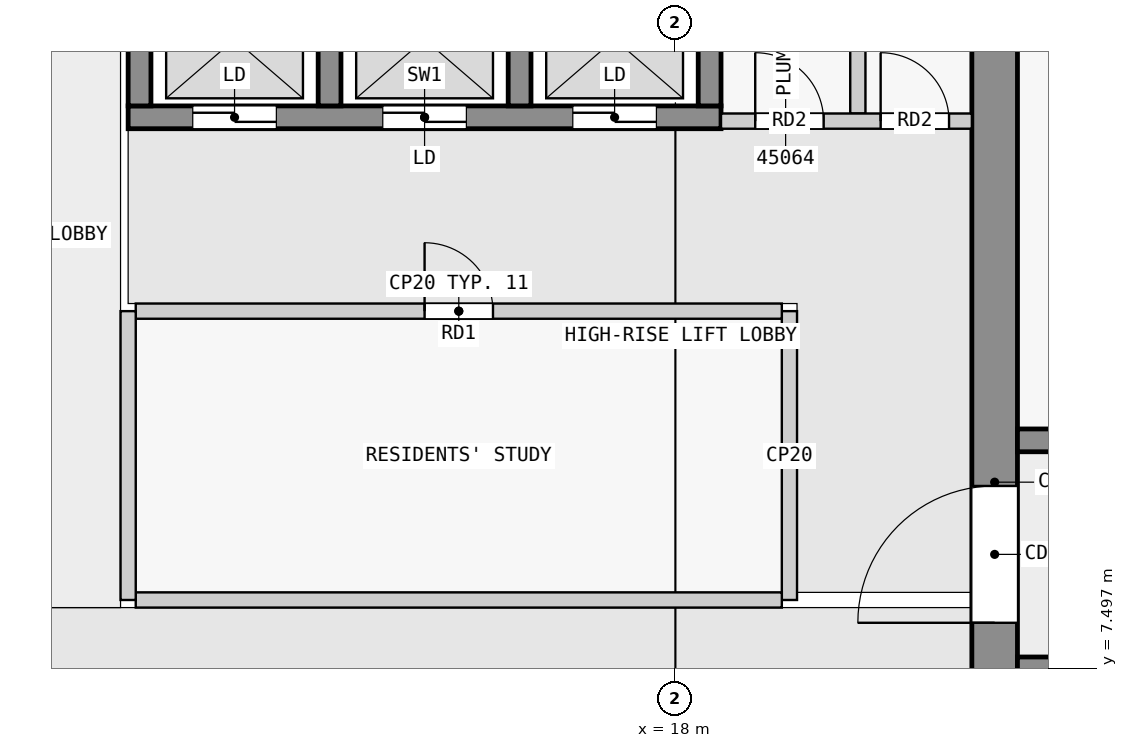
"""IFC4 building model, lengths in metres.
Left out: names, types, materials, properties, quantities, classifications, styles, units other than length and angle.
Written with IfcOpenShell. Run it as: python <this file> out.ifc"""

import sys

from ifc_helpers import new_model, si_unit, direction, frame, frame_2d, origin, place, context, subcontext, project, spatial, rectangle, extrude, element, fill, save


model = new_model("IFC4")
c1 = context("Model", 3, precision=1e-05, world=origin(), true_north=direction((0.0, 1.0)))
c2 = subcontext(c1, "Body", "Model", "MODEL_VIEW")
j1 = project(units=[si_unit("LENGTHUNIT", "METRE"), si_unit("PLANEANGLEUNIT", "RADIAN")], contexts=[c1])
p1 = place(None, origin())
s1 = spatial("IfcSite", under=j1, at=p1, CompositionType="ELEMENT")
p2 = place(p1, origin())
s2 = spatial("IfcBuilding", under=s1, at=p2, CompositionType="ELEMENT")
p3 = place(p2, frame((0.0, 0.0, 174.4)))
s3 = spatial("IfcBuildingStorey", under=s2, at=p3, CompositionType="ELEMENT", Elevation=174.4)
p4 = place(p3, frame((22.2, 2.5, 0.0), z_axis=(0.0, 0.0, 1.0), x_axis=(0.0, 1.0, 0.0)))
e1 = element("IfcWall", 1, at=p4, inside=s3, PredefinedType="SHEAR", context=c2, shape_type="SweptSolid", body=[
    extrude(rectangle(XDim=14.9, YDim=0.6, at=frame_2d((7.45, 0.0))), origin(), (0.0, 0.0, 1.0), 3.25),
])
p5 = place(p4, frame((5.6, 0.0, 0.0)))
e2 = element("IfcOpeningElement", 2, at=p5, cuts=e1, PredefinedType="OPENING", context=c2, shape_type="SweptSolid", body=[
    extrude(rectangle(XDim=1.8, YDim=2.1, at=frame_2d((0.9, 1.05))), frame((0.0, 0.31, 0.0), z_axis=(0.0, -1.0, 0.0), x_axis=(1.0, 0.0, 0.0)), (0.0, 0.0, 1.0), 0.62),
])
p6 = place(p3, frame((10.8, 14.75, 0.0), z_axis=(0.0, 0.0, 1.0), x_axis=(1.0, 0.0, 0.0)))
e3 = element("IfcWall", 3, at=p6, inside=s3, PredefinedType="SHEAR", context=c2, shape_type="SweptSolid", body=[
    extrude(rectangle(XDim=7.8, YDim=0.3, at=frame_2d((3.9, 0.0))), origin(), (0.0, 0.0, 1.0), 3.25),
])
p7 = place(p6, frame((0.85, 0.0, 0.0)))
e4 = element("IfcOpeningElement", 4, at=p7, cuts=e3, PredefinedType="OPENING", context=c2, shape_type="SweptSolid", body=[
    extrude(rectangle(XDim=1.1, YDim=2.1, at=frame_2d((0.55, 1.05))), frame((0.0, 0.16, 0.0), z_axis=(0.0, -1.0, 0.0), x_axis=(1.0, 0.0, 0.0)), (0.0, 0.0, 1.0), 0.32),
])
p8 = place(p6, frame((3.35, 0.0, 0.0)))
e5 = element("IfcOpeningElement", 5, at=p8, cuts=e3, PredefinedType="OPENING", context=c2, shape_type="SweptSolid", body=[
    extrude(rectangle(XDim=1.1, YDim=2.1, at=frame_2d((0.55, 1.05))), frame((0.0, 0.16, 0.0), z_axis=(0.0, -1.0, 0.0), x_axis=(1.0, 0.0, 0.0)), (0.0, 0.0, 1.0), 0.32),
])
p9 = place(p6, frame((5.85, 0.0, 0.0)))
e6 = element("IfcOpeningElement", 6, at=p9, cuts=e3, PredefinedType="OPENING", context=c2, shape_type="SweptSolid", body=[
    extrude(rectangle(XDim=1.1, YDim=2.1, at=frame_2d((0.55, 1.05))), frame((0.0, 0.16, 0.0), z_axis=(0.0, -1.0, 0.0), x_axis=(1.0, 0.0, 0.0)), (0.0, 0.0, 1.0), 0.32),
])
for number, where, z_axis, x_axis in (
    (7, (10.95, 14.9, 0.0), (0.0, 0.0, 1.0), (0.0, 1.0, 0.0)),
    (8, (13.45, 14.9, 0.0), (0.0, 0.0, 1.0), (0.0, 1.0, 0.0)),
    (9, (15.95, 14.9, 0.0), (0.0, 0.0, 1.0), (0.0, 1.0, 0.0)),
    (10, (18.45, 14.9, 0.0), (0.0, 0.0, 1.0), (0.0, 1.0, 0.0)),
):
    element("IfcWall", number, at=place(p3, frame(where, z_axis=z_axis, x_axis=x_axis)), inside=s3, PredefinedType="SHEAR", context=c2, shape_type="SweptSolid", body=[
        extrude(rectangle(XDim=2.0, YDim=0.3, at=frame_2d((1.0, 0.0))), origin(), (0.0, 0.0, 1.0), 3.25),
    ])
p10 = place(p3, frame((22.5, 7.5, 0.0), z_axis=(0.0, 0.0, 1.0), x_axis=(1.0, 0.0, 0.0)))
e11 = element("IfcWall", 11, at=p10, inside=s3, PredefinedType="SHEAR", context=c2, shape_type="SweptSolid", body=[
    extrude(rectangle(XDim=22.5, YDim=0.3, at=frame_2d((11.25, 0.0))), origin(), (0.0, 0.0, 1.0), 3.25),
])
p11 = place(p10, frame((4.05, 0.0, 0.0)))
e12 = element("IfcOpeningElement", 12, at=p11, cuts=e11, PredefinedType="OPENING", context=c2, shape_type="SweptSolid", body=[
    extrude(rectangle(XDim=1.0, YDim=2.1, at=frame_2d((0.5, 1.05))), frame((0.0, 0.16, 0.0), z_axis=(0.0, -1.0, 0.0), x_axis=(1.0, 0.0, 0.0)), (0.0, 0.0, 1.0), 0.32),
])
p12 = place(p10, frame((10.75, 0.0, 0.0)))
e13 = element("IfcOpeningElement", 13, at=p12, cuts=e11, PredefinedType="OPENING", context=c2, shape_type="SweptSolid", body=[
    extrude(rectangle(XDim=1.0, YDim=2.1, at=frame_2d((0.5, 1.05))), frame((0.0, 0.16, 0.0), z_axis=(0.0, -1.0, 0.0), x_axis=(1.0, 0.0, 0.0)), (0.0, 0.0, 1.0), 0.32),
])
p13 = place(p10, frame((15.35, 0.0, 0.0)))
e14 = element("IfcOpeningElement", 14, at=p13, cuts=e11, PredefinedType="OPENING", context=c2, shape_type="SweptSolid", body=[
    extrude(rectangle(XDim=0.9, YDim=2.1, at=frame_2d((0.45, 1.05))), frame((0.0, 0.16, 0.0), z_axis=(0.0, -1.0, 0.0), x_axis=(1.0, 0.0, 0.0)), (0.0, 0.0, 1.0), 0.32),
])
p14 = place(p10, frame((18.75, 0.0, 0.0)))
e15 = element("IfcOpeningElement", 15, at=p14, cuts=e11, PredefinedType="OPENING", context=c2, shape_type="SweptSolid", body=[
    extrude(rectangle(XDim=0.9, YDim=2.1, at=frame_2d((0.45, 1.05))), frame((0.0, 0.16, 0.0), z_axis=(0.0, -1.0, 0.0), x_axis=(1.0, 0.0, 0.0)), (0.0, 0.0, 1.0), 0.32),
])
p15 = place(p10, frame((20.95, 0.0, 0.0)))
e16 = element("IfcOpeningElement", 16, at=p15, cuts=e11, PredefinedType="OPENING", context=c2, shape_type="SweptSolid", body=[
    extrude(rectangle(XDim=1.0, YDim=2.1, at=frame_2d((0.5, 1.05))), frame((0.0, 0.16, 0.0), z_axis=(0.0, -1.0, 0.0), x_axis=(1.0, 0.0, 0.0)), (0.0, 0.0, 1.0), 0.32),
])
p16 = place(p3, frame((22.5, 10.5, 0.0), z_axis=(0.0, 0.0, 1.0), x_axis=(1.0, 0.0, 0.0)))
e17 = element("IfcWall", 17, at=p16, inside=s3, PredefinedType="SHEAR", context=c2, shape_type="SweptSolid", body=[
    extrude(rectangle(XDim=22.5, YDim=0.3, at=frame_2d((11.25, 0.0))), origin(), (0.0, 0.0, 1.0), 3.25),
])
p17 = place(p16, frame((1.85, 0.0, 0.0)))
e18 = element("IfcOpeningElement", 18, at=p17, cuts=e17, PredefinedType="OPENING", context=c2, shape_type="SweptSolid", body=[
    extrude(rectangle(XDim=0.9, YDim=2.1, at=frame_2d((0.45, 1.05))), frame((0.0, 0.16, 0.0), z_axis=(0.0, -1.0, 0.0), x_axis=(1.0, 0.0, 0.0)), (0.0, 0.0, 1.0), 0.32),
])
p18 = place(p16, frame((6.25, 0.0, 0.0)))
e19 = element("IfcOpeningElement", 19, at=p18, cuts=e17, PredefinedType="OPENING", context=c2, shape_type="SweptSolid", body=[
    extrude(rectangle(XDim=1.0, YDim=2.1, at=frame_2d((0.5, 1.05))), frame((0.0, 0.16, 0.0), z_axis=(0.0, -1.0, 0.0), x_axis=(1.0, 0.0, 0.0)), (0.0, 0.0, 1.0), 0.32),
])
p19 = place(p16, frame((10.35, 0.0, 0.0)))
e20 = element("IfcOpeningElement", 20, at=p19, cuts=e17, PredefinedType="OPENING", context=c2, shape_type="SweptSolid", body=[
    extrude(rectangle(XDim=1.8, YDim=2.1, at=frame_2d((0.9, 1.05))), frame((0.0, 0.16, 0.0), z_axis=(0.0, -1.0, 0.0), x_axis=(1.0, 0.0, 0.0)), (0.0, 0.0, 1.0), 0.32),
])
p20 = place(p16, frame((16.85, 0.0, 0.0)))
e21 = element("IfcOpeningElement", 21, at=p20, cuts=e17, PredefinedType="OPENING", context=c2, shape_type="SweptSolid", body=[
    extrude(rectangle(XDim=1.0, YDim=2.1, at=frame_2d((0.5, 1.05))), frame((0.0, 0.16, 0.0), z_axis=(0.0, -1.0, 0.0), x_axis=(1.0, 0.0, 0.0)), (0.0, 0.0, 1.0), 0.32),
])
p21 = place(p3, frame((10.8, 8.4, 0.0), z_axis=(0.0, 0.0, 1.0), x_axis=(0.0, 1.0, 0.0)))
e22 = element("IfcWall", 22, at=p21, inside=s3, PredefinedType="PARTITIONING", context=c2, shape_type="SweptSolid", body=[
    extrude(rectangle(XDim=3.8, YDim=0.2, at=frame_2d((1.9, 0.0))), origin(), (0.0, 0.0, 1.0), 3.25),
])
p22 = place(p3, frame((10.9, 8.4, 0.0), z_axis=(0.0, 0.0, 1.0), x_axis=(1.0, 0.0, 0.0)))
e23 = element("IfcWall", 23, at=p22, inside=s3, PredefinedType="PARTITIONING", context=c2, shape_type="SweptSolid", body=[
    extrude(rectangle(XDim=8.5, YDim=0.2, at=frame_2d((4.25, 0.0))), origin(), (0.0, 0.0, 1.0), 3.25),
])
p23 = place(p3, frame((19.5, 8.4, 0.0), z_axis=(0.0, 0.0, 1.0), x_axis=(0.0, 1.0, 0.0)))
e24 = element("IfcWall", 24, at=p23, inside=s3, PredefinedType="PARTITIONING", context=c2, shape_type="SweptSolid", body=[
    extrude(rectangle(XDim=3.8, YDim=0.2, at=frame_2d((1.9, 0.0))), origin(), (0.0, 0.0, 1.0), 3.25),
])
p24 = place(p3, frame((10.9, 12.2, 0.0), z_axis=(0.0, 0.0, 1.0), x_axis=(1.0, 0.0, 0.0)))
e25 = element("IfcWall", 25, at=p24, inside=s3, PredefinedType="PARTITIONING", context=c2, shape_type="SweptSolid", body=[
    extrude(rectangle(XDim=8.5, YDim=0.2, at=frame_2d((4.25, 0.0))), origin(), (0.0, 0.0, 1.0), 3.25),
])
p25 = place(p24, frame((3.8, 0.0, 0.0)))
e26 = element("IfcOpeningElement", 26, at=p25, cuts=e25, PredefinedType="OPENING", context=c2, shape_type="SweptSolid", body=[
    extrude(rectangle(XDim=0.9, YDim=2.1, at=frame_2d((0.45, 1.05))), frame((0.0, 0.11, 0.0), z_axis=(0.0, -1.0, 0.0), x_axis=(1.0, 0.0, 0.0)), (0.0, 0.0, 1.0), 0.22),
])
p26 = place(p3, frame((18.6, 14.7, 0.0), z_axis=(0.0, 0.0, 1.0), x_axis=(1.0, 0.0, 0.0)))
e27 = element("IfcWall", 27, at=p26, inside=s3, PredefinedType="PARTITIONING", context=c2, shape_type="SweptSolid", body=[
    extrude(rectangle(XDim=3.3, YDim=0.2, at=frame_2d((1.65, 0.0))), origin(), (0.0, 0.0, 1.0), 3.25),
])
p27 = place(p26, frame((0.45, 0.0, 0.0)))
e28 = element("IfcOpeningElement", 28, at=p27, cuts=e27, PredefinedType="OPENING", context=c2, shape_type="SweptSolid", body=[
    extrude(rectangle(XDim=0.9, YDim=2.1, at=frame_2d((0.45, 1.05))), frame((0.0, 0.11, 0.0), z_axis=(0.0, -1.0, 0.0), x_axis=(1.0, 0.0, 0.0)), (0.0, 0.0, 1.0), 0.22),
])
p28 = place(p26, frame((2.1, 0.0, 0.0)))
e29 = element("IfcOpeningElement", 29, at=p28, cuts=e27, PredefinedType="OPENING", context=c2, shape_type="SweptSolid", body=[
    extrude(rectangle(XDim=0.9, YDim=2.1, at=frame_2d((0.45, 1.05))), frame((0.0, 0.11, 0.0), z_axis=(0.0, -1.0, 0.0), x_axis=(1.0, 0.0, 0.0)), (0.0, 0.0, 1.0), 0.22),
])
p29 = place(p3, frame((20.4, 14.8, 0.0), z_axis=(0.0, 0.0, 1.0), x_axis=(0.0, 1.0, 0.0)))
e30 = element("IfcWall", 30, at=p29, inside=s3, PredefinedType="PARTITIONING", context=c2, shape_type="SweptSolid", body=[
    extrude(rectangle(XDim=2.6, YDim=0.2, at=frame_2d((1.3, 0.0))), origin(), (0.0, 0.0, 1.0), 3.25),
])
p30 = place(p25, origin())
e31 = element("IfcDoor", 31, at=p30, inside=s3, OperationType="SINGLE_SWING_LEFT", PredefinedType="DOOR", context=c2, shape_type="SweptSolid", body=[
    extrude(rectangle(XDim=0.9, YDim=2.1, at=frame_2d((0.45, 1.05))), frame((0.0, 0.025, 0.0), z_axis=(0.0, -1.0, 0.0), x_axis=(1.0, 0.0, 0.0)), (0.0, 0.0, 1.0), 0.05),
])
fill(e26, e31)
p31 = place(p7, origin())
e32 = element("IfcDoor", 32, at=p31, inside=s3, OperationType="DOUBLE_DOOR_SLIDING", PredefinedType="DOOR", context=c2, shape_type="SweptSolid", body=[
    extrude(rectangle(XDim=1.1, YDim=2.1, at=frame_2d((0.55, 1.05))), frame((0.0, 0.025, 0.0), z_axis=(0.0, -1.0, 0.0), x_axis=(1.0, 0.0, 0.0)), (0.0, 0.0, 1.0), 0.05),
])
fill(e4, e32)
p32 = place(p8, origin())
e33 = element("IfcDoor", 33, at=p32, inside=s3, OperationType="DOUBLE_DOOR_SLIDING", PredefinedType="DOOR", context=c2, shape_type="SweptSolid", body=[
    extrude(rectangle(XDim=1.1, YDim=2.1, at=frame_2d((0.55, 1.05))), frame((0.0, 0.025, 0.0), z_axis=(0.0, -1.0, 0.0), x_axis=(1.0, 0.0, 0.0)), (0.0, 0.0, 1.0), 0.05),
])
fill(e5, e33)
p33 = place(p9, origin())
e34 = element("IfcDoor", 34, at=p33, inside=s3, OperationType="DOUBLE_DOOR_SLIDING", PredefinedType="DOOR", context=c2, shape_type="SweptSolid", body=[
    extrude(rectangle(XDim=1.1, YDim=2.1, at=frame_2d((0.55, 1.05))), frame((0.0, 0.025, 0.0), z_axis=(0.0, -1.0, 0.0), x_axis=(1.0, 0.0, 0.0)), (0.0, 0.0, 1.0), 0.05),
])
fill(e6, e34)
p34 = place(p5, origin())
e35 = element("IfcDoor", 35, at=p34, inside=s3, OperationType="DOUBLE_DOOR_SINGLE_SWING", PredefinedType="DOOR", context=c2, shape_type="SweptSolid", body=[
    extrude(rectangle(XDim=1.8, YDim=2.1, at=frame_2d((0.9, 1.05))), frame((0.0, 0.025, 0.0), z_axis=(0.0, -1.0, 0.0), x_axis=(1.0, 0.0, 0.0)), (0.0, 0.0, 1.0), 0.05),
])
fill(e2, e35)
p35 = place(p27, origin())
e36 = element("IfcDoor", 36, at=p35, inside=s3, OperationType="SINGLE_SWING_LEFT", PredefinedType="DOOR", context=c2, shape_type="SweptSolid", body=[
    extrude(rectangle(XDim=0.9, YDim=2.1, at=frame_2d((0.45, 1.05))), frame((0.0, 0.025, 0.0), z_axis=(0.0, -1.0, 0.0), x_axis=(1.0, 0.0, 0.0)), (0.0, 0.0, 1.0), 0.05),
])
fill(e28, e36)
p36 = place(p28, origin())
e37 = element("IfcDoor", 37, at=p36, inside=s3, OperationType="SINGLE_SWING_LEFT", PredefinedType="DOOR", context=c2, shape_type="SweptSolid", body=[
    extrude(rectangle(XDim=0.9, YDim=2.1, at=frame_2d((0.45, 1.05))), frame((0.0, 0.025, 0.0), z_axis=(0.0, -1.0, 0.0), x_axis=(1.0, 0.0, 0.0)), (0.0, 0.0, 1.0), 0.05),
])
fill(e29, e37)
save(model, sys.argv[1])
